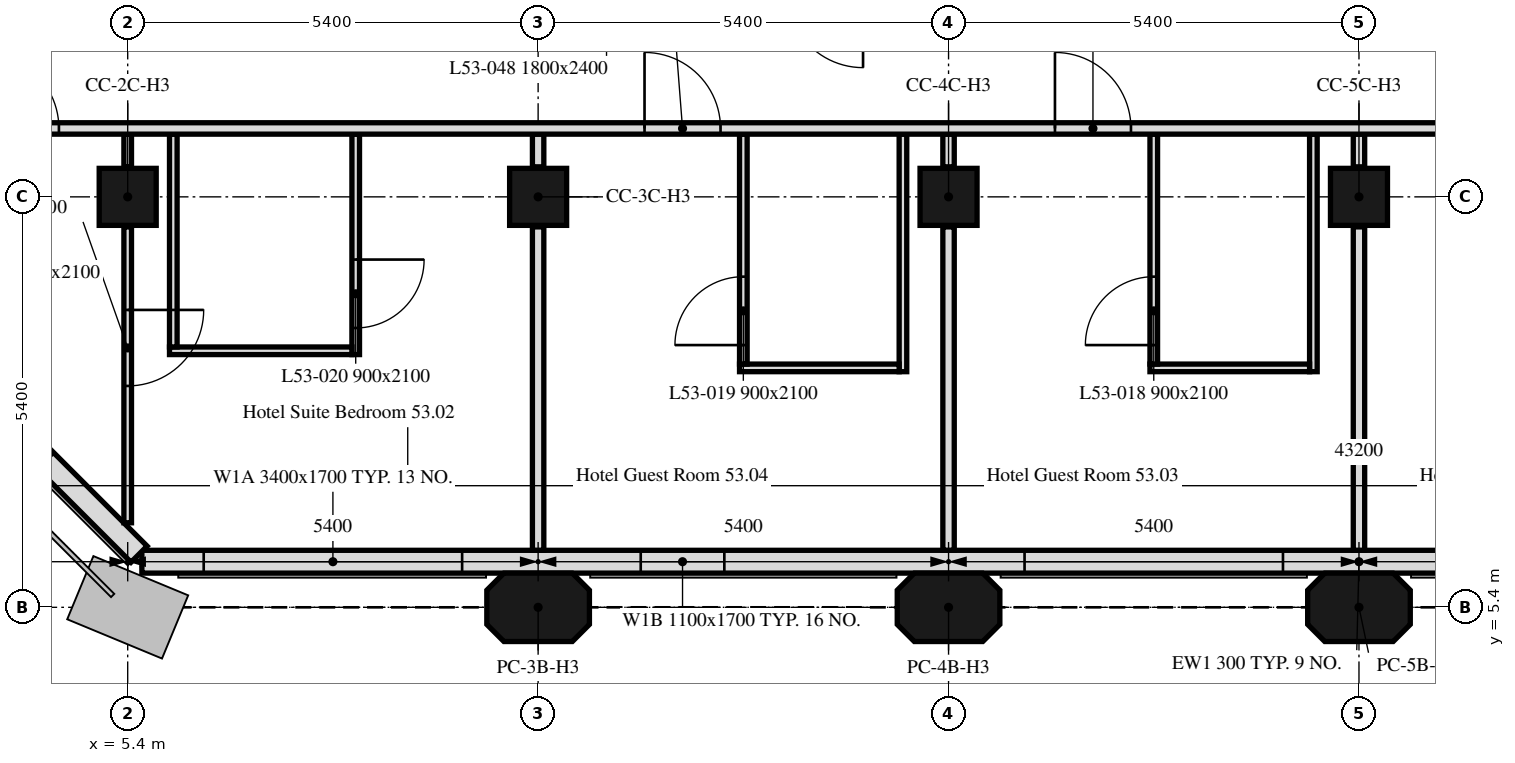
"""IFC4 building model, lengths in metres.
Left out: names, types, materials, properties, quantities, classifications, styles, units other than length and angle.
Written with IfcOpenShell. Run it as: python <this file> out.ifc"""

import sys

from ifc_helpers import new_model, si_unit, direction, frame, frame_2d, origin, origin_2d, place, context, subcontext, project, spatial, polyline, rectangle, outline, extrude, element, fill, save


model = new_model("IFC4")
c1 = context("Model", 3, precision=1e-05, world=origin(), true_north=direction((0.0, 1.0)))
c2 = subcontext(c1, "Body", "Model", "MODEL_VIEW")
j1 = project(units=[si_unit("LENGTHUNIT", "METRE"), si_unit("PLANEANGLEUNIT", "RADIAN")], contexts=[c1])
p1 = place(None, origin())
s1 = spatial("IfcSite", under=j1, at=p1, CompositionType="ELEMENT")
p2 = place(p1, origin())
s2 = spatial("IfcBuilding", under=s1, at=p2, CompositionType="ELEMENT")
p3 = place(p2, frame((0.0, 0.0, 213.7)))
s3 = spatial("IfcBuildingStorey", under=s2, at=p3, CompositionType="ELEMENT", Elevation=213.7)
for number, where, z_axis, x_axis in (
    (1, (10.8, 5.4, 0.0), (0.0, 0.0, 1.0), (1.0, 0.0, 0.0)),
    (2, (16.2, 5.4, 0.0), (0.0, 0.0, 1.0), (1.0, 0.0, 0.0)),
    (3, (21.6, 5.4, 0.0), (0.0, 0.0, 1.0), (1.0, 0.0, 0.0)),
):
    element("IfcColumn", number, at=place(p3, frame(where, z_axis=z_axis, x_axis=x_axis)), inside=s3, PredefinedType="COLUMN", context=c2, shape_type="SweptSolid", body=[
        extrude(outline(polyline([(-0.45, -0.45), (0.45, -0.45), (0.675, -0.225), (0.675, 0.225), (0.45, 0.45), (-0.45, 0.45), (-0.675, 0.225), (-0.675, -0.225), (-0.45, -0.45)])), origin(), (0.0, 0.0, 1.0), 3.0),
    ])
for number, where, z_axis, x_axis in (
    (4, (5.4, 10.8, 0.0), (0.0, 0.0, 1.0), (1.0, 0.0, 0.0)),
    (5, (10.8, 10.8, 0.0), (0.0, 0.0, 1.0), (1.0, 0.0, 0.0)),
    (6, (16.2, 10.8, 0.0), (0.0, 0.0, 1.0), (1.0, 0.0, 0.0)),
    (7, (21.6, 10.8, 0.0), (0.0, 0.0, 1.0), (1.0, 0.0, 0.0)),
):
    element("IfcColumn", number, at=place(p3, frame(where, z_axis=z_axis, x_axis=x_axis)), inside=s3, PredefinedType="COLUMN", context=c2, shape_type="SweptSolid", body=[
        extrude(rectangle(XDim=0.75, YDim=0.75, at=origin_2d()), origin(), (0.0, 0.0, 1.0), 3.0),
    ])
p4 = place(p3, frame((5.586, 6.0, 0.0), z_axis=(0.0, 0.0, 1.0), x_axis=(1.0, 0.0, 0.0)))
e8 = element("IfcWall", 8, at=p4, inside=s3, PredefinedType="SOLIDWALL", context=c2, shape_type="SweptSolid", body=[
    extrude(rectangle(XDim=32.027, YDim=0.3, at=frame_2d((16.014, 0.0))), origin(), (0.0, 0.0, 1.0), 3.0),
])
p5 = place(p4, frame((0.814, 0.0, 0.9)))
e9 = element("IfcOpeningElement", 9, at=p5, cuts=e8, PredefinedType="OPENING", context=c2, shape_type="SweptSolid", body=[
    extrude(rectangle(XDim=3.4, YDim=1.7, at=frame_2d((1.7, 0.85))), frame((0.0, 0.16, 0.0), z_axis=(0.0, -1.0, 0.0), x_axis=(1.0, 0.0, 0.0)), (0.0, 0.0, 1.0), 0.32),
])
p6 = place(p4, frame((6.564, 0.0, 0.9)))
e10 = element("IfcOpeningElement", 10, at=p6, cuts=e8, PredefinedType="OPENING", context=c2, shape_type="SweptSolid", body=[
    extrude(rectangle(XDim=1.1, YDim=1.7, at=frame_2d((0.55, 0.85))), frame((0.0, 0.16, 0.0), z_axis=(0.0, -1.0, 0.0), x_axis=(1.0, 0.0, 0.0)), (0.0, 0.0, 1.0), 0.32),
])
p7 = place(p4, frame((11.614, 0.0, 0.9)))
e11 = element("IfcOpeningElement", 11, at=p7, cuts=e8, PredefinedType="OPENING", context=c2, shape_type="SweptSolid", body=[
    extrude(rectangle(XDim=3.4, YDim=1.7, at=frame_2d((1.7, 0.85))), frame((0.0, 0.16, 0.0), z_axis=(0.0, -1.0, 0.0), x_axis=(1.0, 0.0, 0.0)), (0.0, 0.0, 1.0), 0.32),
])
p8 = place(p4, frame((17.364, 0.0, 0.9)))
e12 = element("IfcOpeningElement", 12, at=p8, cuts=e8, PredefinedType="OPENING", context=c2, shape_type="SweptSolid", body=[
    extrude(rectangle(XDim=1.1, YDim=1.7, at=frame_2d((0.55, 0.85))), frame((0.0, 0.16, 0.0), z_axis=(0.0, -1.0, 0.0), x_axis=(1.0, 0.0, 0.0)), (0.0, 0.0, 1.0), 0.32),
])
p9 = place(p4, frame((22.414, 0.0, 0.9)))
e13 = element("IfcOpeningElement", 13, at=p9, cuts=e8, PredefinedType="OPENING", context=c2, shape_type="SweptSolid", body=[
    extrude(rectangle(XDim=3.4, YDim=1.7, at=frame_2d((1.7, 0.85))), frame((0.0, 0.16, 0.0), z_axis=(0.0, -1.0, 0.0), x_axis=(1.0, 0.0, 0.0)), (0.0, 0.0, 1.0), 0.32),
])
p10 = place(p4, frame((28.164, 0.0, 0.9)))
e14 = element("IfcOpeningElement", 14, at=p10, cuts=e8, PredefinedType="OPENING", context=c2, shape_type="SweptSolid", body=[
    extrude(rectangle(XDim=1.1, YDim=1.7, at=frame_2d((0.55, 0.85))), frame((0.0, 0.16, 0.0), z_axis=(0.0, -1.0, 0.0), x_axis=(1.0, 0.0, 0.0)), (0.0, 0.0, 1.0), 0.32),
])
p11 = place(p3, frame((0.699, 10.949, 0.0), z_axis=(0.0, 0.0, 1.0), x_axis=(0.707106781187, -0.707106781187, 0.0)))
e15 = element("IfcWall", 15, at=p11, inside=s3, PredefinedType="SOLIDWALL", context=c2, shape_type="SweptSolid", body=[
    extrude(rectangle(XDim=6.86, YDim=0.3, at=frame_2d((3.43, 0.0))), origin(), (0.0, 0.0, 1.0), 3.0),
])
p12 = place(p11, frame((1.73, 0.0, 0.9)))
e16 = element("IfcOpeningElement", 16, at=p12, cuts=e15, PredefinedType="OPENING", context=c2, shape_type="SweptSolid", body=[
    extrude(rectangle(XDim=3.4, YDim=1.7, at=frame_2d((1.7, 0.85))), frame((0.0, 0.16, 0.0), z_axis=(0.0, -1.0, 0.0), x_axis=(1.0, 0.0, 0.0)), (0.0, 0.0, 1.0), 0.32),
])
p13 = place(p3, frame((21.6, 11.625, 0.0), z_axis=(0.0, 0.0, 1.0), x_axis=(0.0, -1.0, 0.0)))
e17 = element("IfcWall", 17, at=p13, inside=s3, PredefinedType="PARTITIONING", context=c2, shape_type="SweptSolid", body=[
    extrude(rectangle(XDim=0.43, YDim=0.15, at=frame_2d((0.215, 0.0))), origin(), (0.0, 0.0, 1.0), 3.0),
])
p14 = place(p3, frame((21.6, 10.405, 0.0), z_axis=(0.0, 0.0, 1.0), x_axis=(0.0, -1.0, 0.0)))
e18 = element("IfcWall", 18, at=p14, inside=s3, PredefinedType="PARTITIONING", context=c2, shape_type="SweptSolid", body=[
    extrude(rectangle(XDim=4.254, YDim=0.15, at=frame_2d((2.127, 0.0))), origin(), (0.0, 0.0, 1.0), 3.0),
])
p15 = place(p3, frame((21.0, 11.625, 0.0), z_axis=(0.0, 0.0, 1.0), x_axis=(0.0, -1.0, 0.0)))
e19 = element("IfcWall", 19, at=p15, inside=s3, PredefinedType="PARTITIONING", context=c2, shape_type="SweptSolid", body=[
    extrude(rectangle(XDim=3.125, YDim=0.1, at=frame_2d((1.562, 0.0))), origin(), (0.0, 0.0, 1.0), 3.0),
])
p16 = place(p3, frame((20.95, 8.55, 0.0), z_axis=(0.0, 0.0, 1.0), x_axis=(-1.0, 0.0, 0.0)))
e20 = element("IfcWall", 20, at=p16, inside=s3, PredefinedType="PARTITIONING", context=c2, shape_type="SweptSolid", body=[
    extrude(rectangle(XDim=2.1, YDim=0.1, at=frame_2d((1.05, 0.0))), origin(), (0.0, 0.0, 1.0), 3.0),
])
p17 = place(p3, frame((18.9, 8.6, 0.0), z_axis=(0.0, 0.0, 1.0), x_axis=(0.0, 1.0, 0.0)))
e21 = element("IfcWall", 21, at=p17, inside=s3, PredefinedType="PARTITIONING", context=c2, shape_type="SweptSolid", body=[
    extrude(rectangle(XDim=3.025, YDim=0.1, at=frame_2d((1.512, 0.0))), origin(), (0.0, 0.0, 1.0), 3.0),
])
p18 = place(p17, frame((0.25, 0.0, 0.0)))
e22 = element("IfcOpeningElement", 22, at=p18, cuts=e21, PredefinedType="OPENING", context=c2, shape_type="SweptSolid", body=[
    extrude(rectangle(XDim=0.9, YDim=2.1, at=frame_2d((0.45, 1.05))), frame((0.0, 0.05, 0.0), z_axis=(0.0, -1.0, 0.0), x_axis=(1.0, 0.0, 0.0)), (0.0, 0.0, 1.0), 0.1),
])
p19 = place(p3, frame((16.2, 11.625, 0.0), z_axis=(0.0, 0.0, 1.0), x_axis=(0.0, -1.0, 0.0)))
e23 = element("IfcWall", 23, at=p19, inside=s3, PredefinedType="PARTITIONING", context=c2, shape_type="SweptSolid", body=[
    extrude(rectangle(XDim=0.43, YDim=0.15, at=frame_2d((0.215, 0.0))), origin(), (0.0, 0.0, 1.0), 3.0),
])
p20 = place(p3, frame((16.2, 10.405, 0.0), z_axis=(0.0, 0.0, 1.0), x_axis=(0.0, -1.0, 0.0)))
e24 = element("IfcWall", 24, at=p20, inside=s3, PredefinedType="PARTITIONING", context=c2, shape_type="SweptSolid", body=[
    extrude(rectangle(XDim=4.254, YDim=0.15, at=frame_2d((2.127, 0.0))), origin(), (0.0, 0.0, 1.0), 3.0),
])
p21 = place(p3, frame((15.6, 11.625, 0.0), z_axis=(0.0, 0.0, 1.0), x_axis=(0.0, -1.0, 0.0)))
e25 = element("IfcWall", 25, at=p21, inside=s3, PredefinedType="PARTITIONING", context=c2, shape_type="SweptSolid", body=[
    extrude(rectangle(XDim=3.125, YDim=0.1, at=frame_2d((1.562, 0.0))), origin(), (0.0, 0.0, 1.0), 3.0),
])
p22 = place(p3, frame((15.55, 8.55, 0.0), z_axis=(0.0, 0.0, 1.0), x_axis=(-1.0, 0.0, 0.0)))
e26 = element("IfcWall", 26, at=p22, inside=s3, PredefinedType="PARTITIONING", context=c2, shape_type="SweptSolid", body=[
    extrude(rectangle(XDim=2.1, YDim=0.1, at=frame_2d((1.05, 0.0))), origin(), (0.0, 0.0, 1.0), 3.0),
])
p23 = place(p3, frame((13.5, 8.6, 0.0), z_axis=(0.0, 0.0, 1.0), x_axis=(0.0, 1.0, 0.0)))
e27 = element("IfcWall", 27, at=p23, inside=s3, PredefinedType="PARTITIONING", context=c2, shape_type="SweptSolid", body=[
    extrude(rectangle(XDim=3.025, YDim=0.1, at=frame_2d((1.512, 0.0))), origin(), (0.0, 0.0, 1.0), 3.0),
])
p24 = place(p23, frame((0.25, 0.0, 0.0)))
e28 = element("IfcOpeningElement", 28, at=p24, cuts=e27, PredefinedType="OPENING", context=c2, shape_type="SweptSolid", body=[
    extrude(rectangle(XDim=0.9, YDim=2.1, at=frame_2d((0.45, 1.05))), frame((0.0, 0.05, 0.0), z_axis=(0.0, -1.0, 0.0), x_axis=(1.0, 0.0, 0.0)), (0.0, 0.0, 1.0), 0.1),
])
p25 = place(p3, frame((10.8, 11.625, 0.0), z_axis=(0.0, 0.0, 1.0), x_axis=(0.0, -1.0, 0.0)))
e29 = element("IfcWall", 29, at=p25, inside=s3, PredefinedType="PARTITIONING", context=c2, shape_type="SweptSolid", body=[
    extrude(rectangle(XDim=0.43, YDim=0.15, at=frame_2d((0.215, 0.0))), origin(), (0.0, 0.0, 1.0), 3.0),
])
p26 = place(p3, frame((10.8, 10.405, 0.0), z_axis=(0.0, 0.0, 1.0), x_axis=(0.0, -1.0, 0.0)))
e30 = element("IfcWall", 30, at=p26, inside=s3, PredefinedType="PARTITIONING", context=c2, shape_type="SweptSolid", body=[
    extrude(rectangle(XDim=4.254, YDim=0.15, at=frame_2d((2.127, 0.0))), origin(), (0.0, 0.0, 1.0), 3.0),
])
p27 = place(p3, frame((8.4, 11.625, 0.0), z_axis=(0.0, 0.0, 1.0), x_axis=(0.0, -1.0, 0.0)))
e31 = element("IfcWall", 31, at=p27, inside=s3, PredefinedType="PARTITIONING", context=c2, shape_type="SweptSolid", body=[
    extrude(rectangle(XDim=2.9, YDim=0.1, at=frame_2d((1.45, 0.0))), origin(), (0.0, 0.0, 1.0), 3.0),
])
p28 = place(p27, frame((1.65, 0.0, 0.0)))
e32 = element("IfcOpeningElement", 32, at=p28, cuts=e31, PredefinedType="OPENING", context=c2, shape_type="SweptSolid", body=[
    extrude(rectangle(XDim=0.9, YDim=2.1, at=frame_2d((0.45, 1.05))), frame((0.0, 0.05, 0.0), z_axis=(0.0, -1.0, 0.0), x_axis=(1.0, 0.0, 0.0)), (0.0, 0.0, 1.0), 0.1),
])
p29 = place(p3, frame((8.35, 8.775, 0.0), z_axis=(0.0, 0.0, 1.0), x_axis=(-1.0, 0.0, 0.0)))
e33 = element("IfcWall", 33, at=p29, inside=s3, PredefinedType="PARTITIONING", context=c2, shape_type="SweptSolid", body=[
    extrude(rectangle(XDim=2.4, YDim=0.1, at=frame_2d((1.2, 0.0))), origin(), (0.0, 0.0, 1.0), 3.0),
])
p30 = place(p3, frame((6.0, 8.825, 0.0), z_axis=(0.0, 0.0, 1.0), x_axis=(0.0, 1.0, 0.0)))
e34 = element("IfcWall", 34, at=p30, inside=s3, PredefinedType="PARTITIONING", context=c2, shape_type="SweptSolid", body=[
    extrude(rectangle(XDim=2.8, YDim=0.1, at=frame_2d((1.4, 0.0))), origin(), (0.0, 0.0, 1.0), 3.0),
])
p31 = place(p3, frame((5.4, 11.625, 0.0), z_axis=(0.0, 0.0, 1.0), x_axis=(0.0, -1.0, 0.0)))
e35 = element("IfcWall", 35, at=p31, inside=s3, PredefinedType="PARTITIONING", context=c2, shape_type="SweptSolid", body=[
    extrude(rectangle(XDim=0.43, YDim=0.1, at=frame_2d((0.215, 0.0))), origin(), (0.0, 0.0, 1.0), 3.0),
])
p32 = place(p3, frame((5.4, 10.405, 0.0), z_axis=(0.0, 0.0, 1.0), x_axis=(0.0, -1.0, 0.0)))
e36 = element("IfcWall", 36, at=p32, inside=s3, PredefinedType="PARTITIONING", context=c2, shape_type="SweptSolid", body=[
    extrude(rectangle(XDim=3.893, YDim=0.1, at=frame_2d((1.946, 0.0))), origin(), (0.0, 0.0, 1.0), 3.0),
])
p33 = place(p32, frame((1.093, 0.0, 0.0)))
e37 = element("IfcOpeningElement", 37, at=p33, cuts=e36, PredefinedType="OPENING", context=c2, shape_type="SweptSolid", body=[
    extrude(rectangle(XDim=1.0, YDim=2.1, at=frame_2d((0.5, 1.05))), frame((0.0, 0.05, 0.0), z_axis=(0.0, -1.0, 0.0), x_axis=(1.0, 0.0, 0.0)), (0.0, 0.0, 1.0), 0.1),
])
p34 = place(p3, frame((0.751, 11.7, 0.0), z_axis=(0.0, 0.0, 1.0), x_axis=(1.0, 0.0, 0.0)))
e38 = element("IfcWall", 38, at=p34, inside=s3, PredefinedType="PARTITIONING", context=c2, shape_type="SweptSolid", body=[
    extrude(rectangle(XDim=41.698, YDim=0.15, at=frame_2d((20.849, 0.0))), origin(), (0.0, 0.0, 1.0), 3.0),
])
p35 = place(p34, frame((39.249, 0.0, 0.0)))
e39 = element("IfcOpeningElement", 39, at=p35, cuts=e38, PredefinedType="OPENING", context=c2, shape_type="SweptSolid", body=[
    extrude(rectangle(XDim=1.0, YDim=2.1, at=frame_2d((0.5, 1.05))), frame((0.0, 0.075, 0.0), z_axis=(0.0, -1.0, 0.0), x_axis=(1.0, 0.0, 0.0)), (0.0, 0.0, 1.0), 0.15),
])
p36 = place(p34, frame((27.649, 0.0, 0.0)))
e40 = element("IfcOpeningElement", 40, at=p36, cuts=e38, PredefinedType="OPENING", context=c2, shape_type="SweptSolid", body=[
    extrude(rectangle(XDim=1.0, YDim=2.1, at=frame_2d((0.5, 1.05))), frame((0.0, 0.075, 0.0), z_axis=(0.0, -1.0, 0.0), x_axis=(1.0, 0.0, 0.0)), (0.0, 0.0, 1.0), 0.15),
])
p37 = place(p34, frame((22.249, 0.0, 0.0)))
e41 = element("IfcOpeningElement", 41, at=p37, cuts=e38, PredefinedType="OPENING", context=c2, shape_type="SweptSolid", body=[
    extrude(rectangle(XDim=1.0, YDim=2.1, at=frame_2d((0.5, 1.05))), frame((0.0, 0.075, 0.0), z_axis=(0.0, -1.0, 0.0), x_axis=(1.0, 0.0, 0.0)), (0.0, 0.0, 1.0), 0.15),
])
p38 = place(p34, frame((16.849, 0.0, 0.0)))
e42 = element("IfcOpeningElement", 42, at=p38, cuts=e38, PredefinedType="OPENING", context=c2, shape_type="SweptSolid", body=[
    extrude(rectangle(XDim=1.0, YDim=2.1, at=frame_2d((0.5, 1.05))), frame((0.0, 0.075, 0.0), z_axis=(0.0, -1.0, 0.0), x_axis=(1.0, 0.0, 0.0)), (0.0, 0.0, 1.0), 0.15),
])
p39 = place(p34, frame((11.449, 0.0, 0.0)))
e43 = element("IfcOpeningElement", 43, at=p39, cuts=e38, PredefinedType="OPENING", context=c2, shape_type="SweptSolid", body=[
    extrude(rectangle(XDim=1.0, YDim=2.1, at=frame_2d((0.5, 1.05))), frame((0.0, 0.075, 0.0), z_axis=(0.0, -1.0, 0.0), x_axis=(1.0, 0.0, 0.0)), (0.0, 0.0, 1.0), 0.15),
])
p40 = place(p34, frame((2.744, 0.0, 0.0)))
e44 = element("IfcOpeningElement", 44, at=p40, cuts=e38, PredefinedType="OPENING", context=c2, shape_type="SweptSolid", body=[
    extrude(rectangle(XDim=1.0, YDim=2.1, at=frame_2d((0.5, 1.05))), frame((0.0, 0.075, 0.0), z_axis=(0.0, -1.0, 0.0), x_axis=(1.0, 0.0, 0.0)), (0.0, 0.0, 1.0), 0.15),
])
p41 = place(p5, origin())
e45 = element("IfcWindow", 45, at=p41, inside=s3, PartitioningType="SINGLE_PANEL", PredefinedType="WINDOW", context=c2, shape_type="SweptSolid", body=[
    extrude(rectangle(XDim=3.4, YDim=1.7, at=frame_2d((1.7, 0.85))), frame((0.0, 0.03, 0.0), z_axis=(0.0, -1.0, 0.0), x_axis=(1.0, 0.0, 0.0)), (0.0, 0.0, 1.0), 0.06),
])
fill(e9, e45)
p42 = place(p6, origin())
e46 = element("IfcWindow", 46, at=p42, inside=s3, PartitioningType="SINGLE_PANEL", PredefinedType="WINDOW", context=c2, shape_type="SweptSolid", body=[
    extrude(rectangle(XDim=1.1, YDim=1.7, at=frame_2d((0.55, 0.85))), frame((0.0, 0.03, 0.0), z_axis=(0.0, -1.0, 0.0), x_axis=(1.0, 0.0, 0.0)), (0.0, 0.0, 1.0), 0.06),
])
fill(e10, e46)
p43 = place(p7, origin())
e47 = element("IfcWindow", 47, at=p43, inside=s3, PartitioningType="SINGLE_PANEL", PredefinedType="WINDOW", context=c2, shape_type="SweptSolid", body=[
    extrude(rectangle(XDim=3.4, YDim=1.7, at=frame_2d((1.7, 0.85))), frame((0.0, 0.03, 0.0), z_axis=(0.0, -1.0, 0.0), x_axis=(1.0, 0.0, 0.0)), (0.0, 0.0, 1.0), 0.06),
])
fill(e11, e47)
p44 = place(p18, origin())
e48 = element("IfcDoor", 48, at=p44, inside=s3, OperationType="SINGLE_SWING_LEFT", PredefinedType="DOOR", context=c2, shape_type="SweptSolid", body=[
    extrude(rectangle(XDim=0.9, YDim=2.1, at=frame_2d((0.45, 1.05))), frame((0.0, 0.025, 0.0), z_axis=(0.0, -1.0, 0.0), x_axis=(1.0, 0.0, 0.0)), (0.0, 0.0, 1.0), 0.05),
])
fill(e22, e48)
p45 = place(p24, origin())
e49 = element("IfcDoor", 49, at=p45, inside=s3, OperationType="SINGLE_SWING_RIGHT", PredefinedType="DOOR", context=c2, shape_type="SweptSolid", body=[
    extrude(rectangle(XDim=0.9, YDim=2.1, at=frame_2d((0.45, 1.05))), frame((0.0, 0.025, 0.0), z_axis=(0.0, -1.0, 0.0), x_axis=(1.0, 0.0, 0.0)), (0.0, 0.0, 1.0), 0.05),
])
fill(e28, e49)
p46 = place(p28, origin())
e50 = element("IfcDoor", 50, at=p46, inside=s3, OperationType="SINGLE_SWING_RIGHT", PredefinedType="DOOR", context=c2, shape_type="SweptSolid", body=[
    extrude(rectangle(XDim=0.9, YDim=2.1, at=frame_2d((0.45, 1.05))), frame((0.0, 0.025, 0.0), z_axis=(0.0, -1.0, 0.0), x_axis=(1.0, 0.0, 0.0)), (0.0, 0.0, 1.0), 0.05),
])
fill(e32, e50)
p47 = place(p38, origin())
e51 = element("IfcDoor", 51, at=p47, inside=s3, OperationType="SINGLE_SWING_RIGHT", PredefinedType="DOOR", context=c2, shape_type="SweptSolid", body=[
    extrude(rectangle(XDim=1.0, YDim=2.1, at=frame_2d((0.5, 1.05))), frame((0.0, 0.025, 0.0), z_axis=(0.0, -1.0, 0.0), x_axis=(1.0, 0.0, 0.0)), (0.0, 0.0, 1.0), 0.05),
])
fill(e42, e51)
p48 = place(p39, origin())
e52 = element("IfcDoor", 52, at=p48, inside=s3, OperationType="SINGLE_SWING_RIGHT", PredefinedType="DOOR", context=c2, shape_type="SweptSolid", body=[
    extrude(rectangle(XDim=1.0, YDim=2.1, at=frame_2d((0.5, 1.05))), frame((0.0, 0.025, 0.0), z_axis=(0.0, -1.0, 0.0), x_axis=(1.0, 0.0, 0.0)), (0.0, 0.0, 1.0), 0.05),
])
fill(e43, e52)
p49 = place(p33, origin())
e53 = element("IfcDoor", 53, at=p49, inside=s3, OperationType="SINGLE_SWING_RIGHT", PredefinedType="DOOR", context=c2, shape_type="SweptSolid", body=[
    extrude(rectangle(XDim=1.0, YDim=2.1, at=frame_2d((0.5, 1.05))), frame((0.0, 0.025, 0.0), z_axis=(0.0, -1.0, 0.0), x_axis=(1.0, 0.0, 0.0)), (0.0, 0.0, 1.0), 0.05),
])
fill(e37, e53)
p50 = place(p40, origin())
e54 = element("IfcDoor", 54, at=p50, inside=s3, OperationType="SINGLE_SWING_RIGHT", PredefinedType="DOOR", context=c2, shape_type="SweptSolid", body=[
    extrude(rectangle(XDim=1.0, YDim=2.1, at=frame_2d((0.5, 1.05))), frame((0.0, 0.025, 0.0), z_axis=(0.0, -1.0, 0.0), x_axis=(1.0, 0.0, 0.0)), (0.0, 0.0, 1.0), 0.05),
])
fill(e44, e54)
save(model, sys.argv[1])
